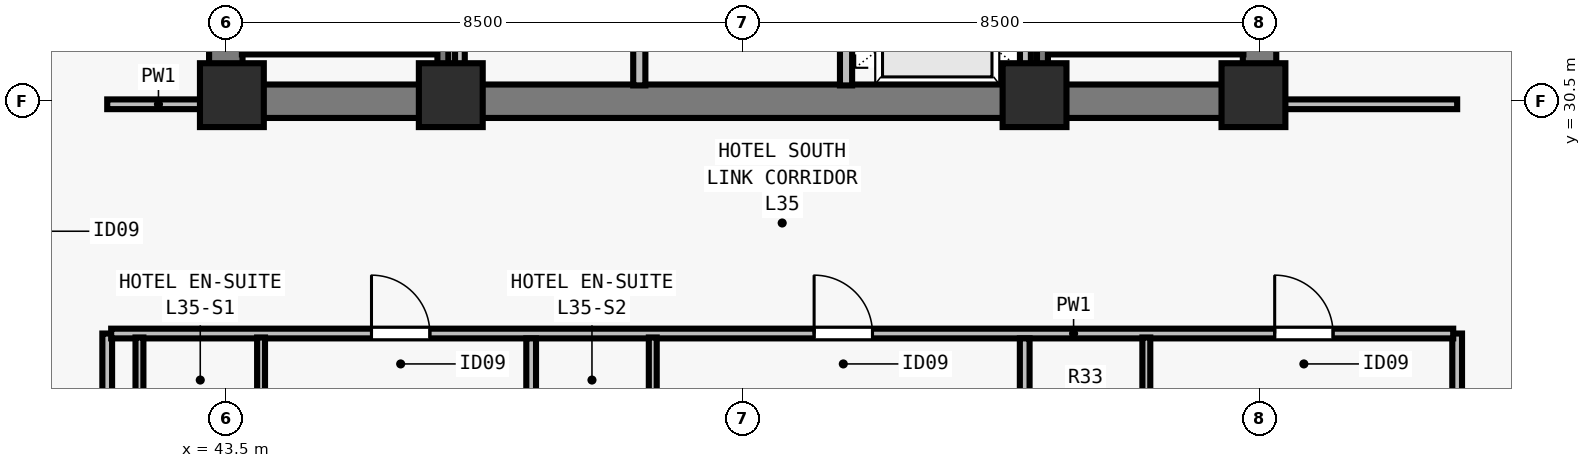
"""IFC4 building model, lengths in metres.
Left out: names, types, materials, properties, quantities, classifications, styles, units other than length and angle.
Written with IfcOpenShell. Run it as: python <this file> out.ifc"""

import sys

from ifc_helpers import new_model, si_unit, direction, frame, frame_2d, origin, origin_2d, place, context, subcontext, project, spatial, rectangle, extrude, element, fill, save


model = new_model("IFC4")
c1 = context("Model", 3, precision=1e-05, world=origin(), true_north=direction((0.0, 1.0)))
c2 = subcontext(c1, "Body", "Model", "MODEL_VIEW")
j1 = project(units=[si_unit("LENGTHUNIT", "METRE"), si_unit("PLANEANGLEUNIT", "RADIAN")], contexts=[c1])
p1 = place(None, origin())
s1 = spatial("IfcSite", under=j1, at=p1, CompositionType="ELEMENT")
p2 = place(p1, origin())
s2 = spatial("IfcBuilding", under=s1, at=p2, CompositionType="ELEMENT")
p3 = place(p2, frame((0.0, 0.0, 130.5)))
s3 = spatial("IfcBuildingStorey", under=s2, at=p3, CompositionType="ELEMENT", Elevation=130.5)
for number, where, z_axis, x_axis in (
    (1, (43.6, 30.6, 0.0), (0.0, 0.0, 1.0), (1.0, 0.0, 0.0)),
    (2, (47.2, 30.6, 0.0), (0.0, 0.0, 1.0), (1.0, 0.0, 0.0)),
    (3, (56.8, 30.6, 0.0), (0.0, 0.0, 1.0), (1.0, 0.0, 0.0)),
    (4, (60.4, 30.6, 0.0), (0.0, 0.0, 1.0), (1.0, 0.0, 0.0)),
):
    element("IfcColumn", number, at=place(p3, frame(where, z_axis=z_axis, x_axis=x_axis)), inside=s3, PredefinedType="COLUMN", context=c2, shape_type="SweptSolid", body=[
        extrude(rectangle(XDim=1.05, YDim=1.05, at=origin_2d()), origin(), (0.0, 0.0, 1.0), 3.5),
    ])
p4 = place(p3, frame((43.225, 30.5, 0.0), z_axis=(0.0, 0.0, 1.0), x_axis=(1.0, 0.0, 0.0)))
e5 = element("IfcWall", 5, at=p4, inside=s3, PredefinedType="SHEAR", context=c2, shape_type="SweptSolid", body=[
    extrude(rectangle(XDim=17.55, YDim=0.55, at=frame_2d((8.775, 0.0))), origin(), (0.0, 0.0, 1.0), 3.28),
])
for number, where, z_axis, x_axis in (
    (6, (43.5, 30.765, 0.0), (0.0, 0.0, 1.0), (0.0, 1.0, 0.0)),
    (7, (60.5, 30.765, 0.0), (0.0, 0.0, 1.0), (0.0, 1.0, 0.0)),
):
    element("IfcWall", number, at=place(p3, frame(where, z_axis=z_axis, x_axis=x_axis)), inside=s3, PredefinedType="SHEAR", context=c2, shape_type="SweptSolid", body=[
        extrude(rectangle(XDim=7.985, YDim=0.55, at=frame_2d((3.993, 0.0))), origin(), (0.0, 0.0, 1.0), 3.28),
    ])
p5 = place(p3, frame((50.3, 30.76, 0.0), z_axis=(0.0, 0.0, 1.0), x_axis=(0.0, 1.0, 0.0)))
e8 = element("IfcWall", 8, at=p5, inside=s3, PredefinedType="SOLIDWALL", context=c2, shape_type="SweptSolid", body=[
    extrude(rectangle(XDim=7.855, YDim=0.2, at=frame_2d((3.927, 0.0))), origin(), (0.0, 0.0, 1.0), 3.28),
])
p6 = place(p5, frame((1.34, 0.0, 0.0)))
e9 = element("IfcOpeningElement", 9, at=p6, cuts=e8, PredefinedType="OPENING", context=c2, shape_type="SweptSolid", body=[
    extrude(rectangle(XDim=0.9, YDim=2.12, at=frame_2d((0.45, 1.06))), frame((0.0, 0.11, 0.0), z_axis=(0.0, -1.0, 0.0), x_axis=(1.0, 0.0, 0.0)), (0.0, 0.0, 1.0), 0.22),
])
p7 = place(p5, frame((5.34, 0.0, 0.0)))
e10 = element("IfcOpeningElement", 10, at=p7, cuts=e8, PredefinedType="OPENING", context=c2, shape_type="SweptSolid", body=[
    extrude(rectangle(XDim=0.9, YDim=2.12, at=frame_2d((0.45, 1.06))), frame((0.0, 0.11, 0.0), z_axis=(0.0, -1.0, 0.0), x_axis=(1.0, 0.0, 0.0)), (0.0, 0.0, 1.0), 0.22),
])
p8 = place(p3, frame((53.7, 30.76, 0.0), z_axis=(0.0, 0.0, 1.0), x_axis=(0.0, 1.0, 0.0)))
e11 = element("IfcWall", 11, at=p8, inside=s3, PredefinedType="SOLIDWALL", context=c2, shape_type="SweptSolid", body=[
    extrude(rectangle(XDim=7.855, YDim=0.2, at=frame_2d((3.927, 0.0))), origin(), (0.0, 0.0, 1.0), 3.28),
])
p9 = place(p8, frame((0.79, 0.0, 0.0)))
e12 = element("IfcOpeningElement", 12, at=p9, cuts=e11, PredefinedType="OPENING", context=c2, shape_type="SweptSolid", body=[
    extrude(rectangle(XDim=1.1, YDim=2.2, at=frame_2d((0.55, 1.1))), frame((0.0, 0.11, 0.0), z_axis=(0.0, -1.0, 0.0), x_axis=(1.0, 0.0, 0.0)), (0.0, 0.0, 1.0), 0.22),
])
p10 = place(p8, frame((3.49, 0.0, 0.0)))
e13 = element("IfcOpeningElement", 13, at=p10, cuts=e11, PredefinedType="OPENING", context=c2, shape_type="SweptSolid", body=[
    extrude(rectangle(XDim=1.1, YDim=2.2, at=frame_2d((0.55, 1.1))), frame((0.0, 0.11, 0.0), z_axis=(0.0, -1.0, 0.0), x_axis=(1.0, 0.0, 0.0)), (0.0, 0.0, 1.0), 0.22),
])
p11 = place(p8, frame((6.19, 0.0, 0.0)))
e14 = element("IfcOpeningElement", 14, at=p11, cuts=e11, PredefinedType="OPENING", context=c2, shape_type="SweptSolid", body=[
    extrude(rectangle(XDim=1.1, YDim=2.2, at=frame_2d((0.55, 1.1))), frame((0.0, 0.11, 0.0), z_axis=(0.0, -1.0, 0.0), x_axis=(1.0, 0.0, 0.0)), (0.0, 0.0, 1.0), 0.22),
])
p12 = place(p3, frame((47.35, 30.76, 0.0), z_axis=(0.0, 0.0, 1.0), x_axis=(0.0, 1.0, 0.0)))
e15 = element("IfcWall", 15, at=p12, inside=s3, PredefinedType="PARTITIONING", context=c2, shape_type="SweptSolid", body=[
    extrude(rectangle(XDim=7.855, YDim=0.16, at=frame_2d((3.927, 0.0))), origin(), (0.0, 0.0, 1.0), 3.28),
])
p13 = place(p3, frame((56.65, 30.76, 0.0), z_axis=(0.0, 0.0, 1.0), x_axis=(0.0, 1.0, 0.0)))
e16 = element("IfcWall", 16, at=p13, inside=s3, PredefinedType="SOLIDWALL", context=c2, shape_type="SweptSolid", body=[
    extrude(rectangle(XDim=7.855, YDim=0.18, at=frame_2d((3.927, 0.0))), origin(), (0.0, 0.0, 1.0), 3.28),
])
p14 = place(p3, frame((41.55, 15.325, 0.0), z_axis=(0.0, 0.0, 1.0), x_axis=(0.0, 1.0, 0.0)))
e17 = element("IfcWall", 17, at=p14, inside=s3, PredefinedType="PARTITIONING", context=c2, shape_type="SweptSolid", body=[
    extrude(rectangle(XDim=11.355, YDim=0.16, at=frame_2d((5.677, 0.0))), origin(), (0.0, 0.0, 1.0), 3.28),
])
p15 = place(p3, frame((41.55, 30.45, 0.0), z_axis=(0.0, 0.0, 1.0), x_axis=(1.0, 0.0, 0.0)))
e18 = element("IfcWall", 18, at=p15, inside=s3, PredefinedType="PARTITIONING", context=c2, shape_type="SweptSolid", body=[
    extrude(rectangle(XDim=1.685, YDim=0.16, at=frame_2d((0.843, 0.0))), origin(), (0.0, 0.0, 1.0), 3.28),
])
p16 = place(p3, frame((63.75, 15.325, 0.0), z_axis=(0.0, 0.0, 1.0), x_axis=(0.0, 1.0, 0.0)))
e19 = element("IfcWall", 19, at=p16, inside=s3, PredefinedType="PARTITIONING", context=c2, shape_type="SweptSolid", body=[
    extrude(rectangle(XDim=11.355, YDim=0.16, at=frame_2d((5.677, 0.0))), origin(), (0.0, 0.0, 1.0), 2.555),
])
p17 = place(p3, frame((60.765, 30.45, 0.0), z_axis=(0.0, 0.0, 1.0), x_axis=(1.0, 0.0, 0.0)))
e20 = element("IfcWall", 20, at=p17, inside=s3, PredefinedType="PARTITIONING", context=c2, shape_type="SweptSolid", body=[
    extrude(rectangle(XDim=2.985, YDim=0.16, at=frame_2d((1.493, 0.0))), origin(), (0.0, 0.0, 1.0), 3.28),
])
p18 = place(p3, frame((41.615, 26.68, 0.0), z_axis=(0.0, 0.0, 1.0), x_axis=(1.0, 0.0, 0.0)))
e21 = element("IfcWall", 21, at=p18, inside=s3, PredefinedType="PARTITIONING", context=c2, shape_type="SweptSolid", body=[
    extrude(rectangle(XDim=22.07, YDim=0.16, at=frame_2d((11.035, 0.0))), origin(), (0.0, 0.0, 1.0), 3.28),
])
p19 = place(p18, frame((4.281, 0.0, 0.0)))
e22 = element("IfcOpeningElement", 22, at=p19, cuts=e21, PredefinedType="OPENING", context=c2, shape_type="SweptSolid", body=[
    extrude(rectangle(XDim=0.96, YDim=2.15, at=frame_2d((0.48, 1.075))), frame((0.0, 0.09, 0.0), z_axis=(0.0, -1.0, 0.0), x_axis=(1.0, 0.0, 0.0)), (0.0, 0.0, 1.0), 0.18),
])
p20 = place(p18, frame((11.56, 0.0, 0.0)))
e23 = element("IfcOpeningElement", 23, at=p20, cuts=e21, PredefinedType="OPENING", context=c2, shape_type="SweptSolid", body=[
    extrude(rectangle(XDim=0.96, YDim=2.15, at=frame_2d((0.48, 1.075))), frame((0.0, 0.09, 0.0), z_axis=(0.0, -1.0, 0.0), x_axis=(1.0, 0.0, 0.0)), (0.0, 0.0, 1.0), 0.18),
])
p21 = place(p18, frame((19.134, 0.0, 0.0)))
e24 = element("IfcOpeningElement", 24, at=p21, cuts=e21, PredefinedType="OPENING", context=c2, shape_type="SweptSolid", body=[
    extrude(rectangle(XDim=0.96, YDim=2.15, at=frame_2d((0.48, 1.075))), frame((0.0, 0.09, 0.0), z_axis=(0.0, -1.0, 0.0), x_axis=(1.0, 0.0, 0.0)), (0.0, 0.0, 1.0), 0.18),
])
for number, where, z_axis, x_axis in (
    (25, (42.08, 24.3, 0.0), (0.0, 0.0, 1.0), (0.0, 1.0, 0.0)),
    (26, (44.08, 24.3, 0.0), (0.0, 0.0, 1.0), (0.0, 1.0, 0.0)),
):
    element("IfcWall", number, at=place(p3, frame(where, z_axis=z_axis, x_axis=x_axis)), inside=s3, PredefinedType="PLUMBINGWALL", context=c2, shape_type="SweptSolid", body=[
        extrude(rectangle(XDim=2.315, YDim=0.13, at=frame_2d((1.157, 0.0))), origin(), (0.0, 0.0, 1.0), 3.28),
    ])
p22 = place(p3, frame((48.522, 15.325, 0.0), z_axis=(0.0, 0.0, 1.0), x_axis=(0.0, 1.0, 0.0)))
e27 = element("IfcWall", 27, at=p22, inside=s3, PredefinedType="PARTITIONING", context=c2, shape_type="SweptSolid", body=[
    extrude(rectangle(XDim=11.275, YDim=0.16, at=frame_2d((5.638, 0.0))), origin(), (0.0, 0.0, 1.0), 2.896),
])
p23 = place(p3, frame((50.522, 24.3, 0.0), z_axis=(0.0, 0.0, 1.0), x_axis=(0.0, 1.0, 0.0)))
e28 = element("IfcWall", 28, at=p23, inside=s3, PredefinedType="PLUMBINGWALL", context=c2, shape_type="SweptSolid", body=[
    extrude(rectangle(XDim=2.315, YDim=0.13, at=frame_2d((1.157, 0.0))), origin(), (0.0, 0.0, 1.0), 3.28),
])
p24 = place(p3, frame((56.638, 15.325, 0.0), z_axis=(0.0, 0.0, 1.0), x_axis=(0.0, 1.0, 0.0)))
e29 = element("IfcWall", 29, at=p24, inside=s3, PredefinedType="PARTITIONING", context=c2, shape_type="SweptSolid", body=[
    extrude(rectangle(XDim=11.275, YDim=0.16, at=frame_2d((5.638, 0.0))), origin(), (0.0, 0.0, 1.0), 2.555),
])
p25 = place(p3, frame((58.638, 24.3, 0.0), z_axis=(0.0, 0.0, 1.0), x_axis=(0.0, 1.0, 0.0)))
e30 = element("IfcWall", 30, at=p25, inside=s3, PredefinedType="PLUMBINGWALL", context=c2, shape_type="SweptSolid", body=[
    extrude(rectangle(XDim=2.315, YDim=0.13, at=frame_2d((1.157, 0.0))), origin(), (0.0, 0.0, 1.0), 3.28),
])
p26 = place(p3, frame((43.765, 31.36, 0.0), z_axis=(0.0, 0.0, 1.0), x_axis=(1.0, 0.0, 0.0)))
e31 = element("IfcWall", 31, at=p26, inside=s3, PredefinedType="SOLIDWALL", context=c2, shape_type="SweptSolid", body=[
    extrude(rectangle(XDim=3.23, YDim=0.18, at=frame_2d((1.615, 0.0))), origin(), (0.0, 0.0, 1.0), 3.28),
])
p27 = place(p3, frame((47.07, 38.78, 0.0), z_axis=(0.0, 0.0, 1.0), x_axis=(0.0, -1.0, 0.0)))
e32 = element("IfcWall", 32, at=p27, inside=s3, PredefinedType="SOLIDWALL", context=c2, shape_type="SweptSolid", body=[
    extrude(rectangle(XDim=8.017, YDim=0.18, at=frame_2d((4.009, 0.0))), origin(), (0.0, 0.0, 1.0), 3.28),
])
p28 = place(p3, frame((57.005, 31.36, 0.0), z_axis=(0.0, 0.0, 1.0), x_axis=(1.0, 0.0, 0.0)))
e33 = element("IfcWall", 33, at=p28, inside=s3, PredefinedType="SOLIDWALL", context=c2, shape_type="SweptSolid", body=[
    extrude(rectangle(XDim=3.23, YDim=0.18, at=frame_2d((1.615, 0.0))), origin(), (0.0, 0.0, 1.0), 3.28),
])
p29 = place(p3, frame((56.93, 38.78, 0.0), z_axis=(0.0, 0.0, 1.0), x_axis=(0.0, -1.0, 0.0)))
e34 = element("IfcWall", 34, at=p29, inside=s3, PredefinedType="SOLIDWALL", context=c2, shape_type="SweptSolid", body=[
    extrude(rectangle(XDim=8.017, YDim=0.18, at=frame_2d((4.009, 0.0))), origin(), (0.0, 0.0, 1.0), 3.28),
])
p30 = place(p19, origin())
e35 = element("IfcDoor", 35, at=p30, inside=s3, OperationType="SINGLE_SWING_LEFT", PredefinedType="DOOR", context=c2, shape_type="SweptSolid", body=[
    extrude(rectangle(XDim=0.96, YDim=2.15, at=frame_2d((0.48, 1.075))), frame((0.0, 0.025, 0.0), z_axis=(0.0, -1.0, 0.0), x_axis=(1.0, 0.0, 0.0)), (0.0, 0.0, 1.0), 0.05),
])
fill(e22, e35)
p31 = place(p20, origin())
e36 = element("IfcDoor", 36, at=p31, inside=s3, OperationType="SINGLE_SWING_LEFT", PredefinedType="DOOR", context=c2, shape_type="SweptSolid", body=[
    extrude(rectangle(XDim=0.96, YDim=2.15, at=frame_2d((0.48, 1.075))), frame((0.0, 0.025, 0.0), z_axis=(0.0, -1.0, 0.0), x_axis=(1.0, 0.0, 0.0)), (0.0, 0.0, 1.0), 0.05),
])
fill(e23, e36)
p32 = place(p21, origin())
e37 = element("IfcDoor", 37, at=p32, inside=s3, OperationType="SINGLE_SWING_LEFT", PredefinedType="DOOR", context=c2, shape_type="SweptSolid", body=[
    extrude(rectangle(XDim=0.96, YDim=2.15, at=frame_2d((0.48, 1.075))), frame((0.0, 0.025, 0.0), z_axis=(0.0, -1.0, 0.0), x_axis=(1.0, 0.0, 0.0)), (0.0, 0.0, 1.0), 0.05),
])
fill(e24, e37)
save(model, sys.argv[1])
